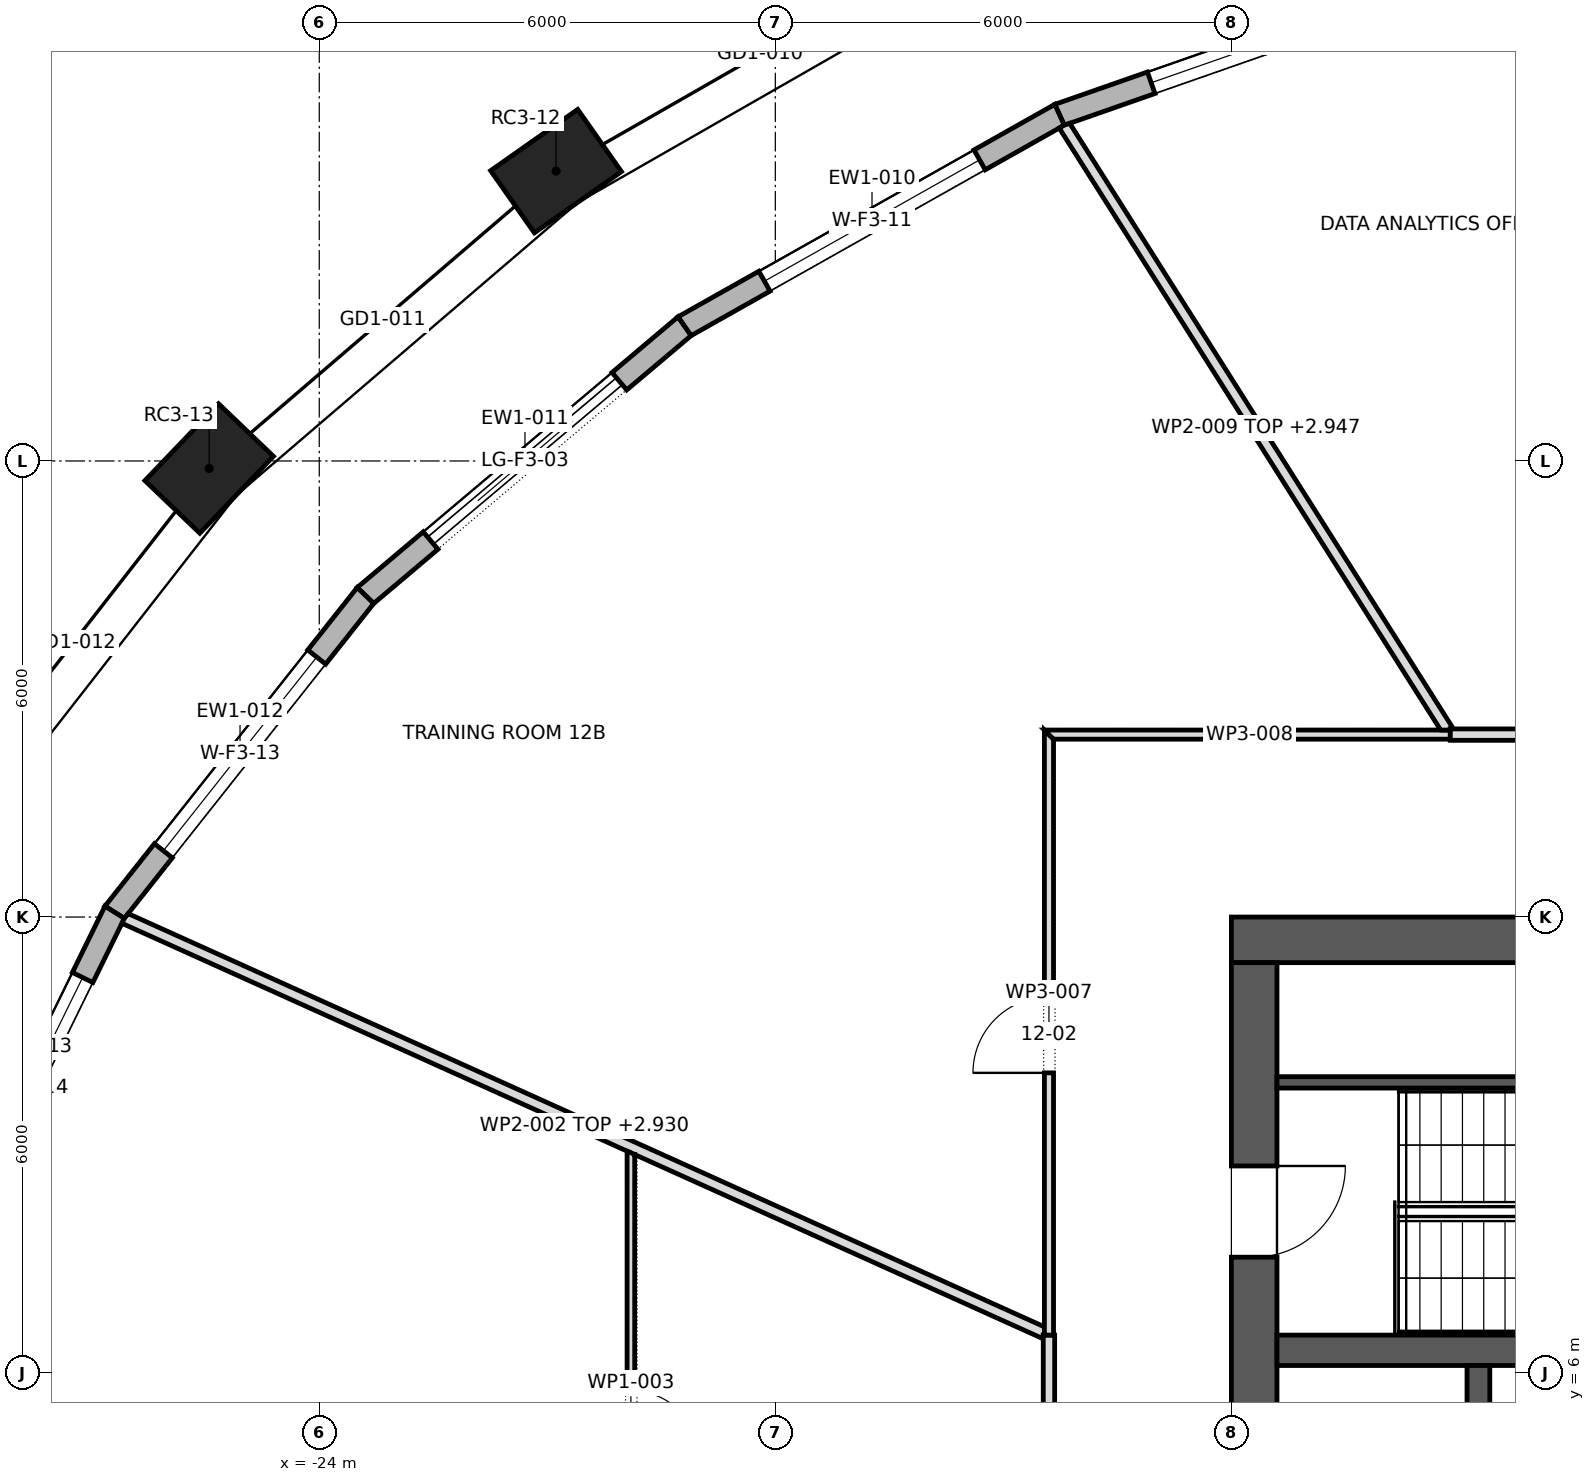
"""IFC4 building model, lengths in metres.
Left out: names, types, materials, properties, quantities, classifications, styles, units other than length and angle.
Written with IfcOpenShell. Run it as: python <this file> out.ifc"""

import sys

from ifc_helpers import new_model, si_unit, direction, frame, frame_2d, origin, origin_2d, place, context, subcontext, project, spatial, polyline, rectangle, outline, extrude, element, fill, save


model = new_model("IFC4")
c1 = context("Model", 3, precision=1e-05, world=origin(), true_north=direction((0.0, 1.0)))
c2 = subcontext(c1, "Body", "Model", "MODEL_VIEW")
j1 = project(units=[si_unit("LENGTHUNIT", "METRE"), si_unit("PLANEANGLEUNIT", "RADIAN")], contexts=[c1])
p1 = place(None, origin())
s1 = spatial("IfcSite", under=j1, at=p1, CompositionType="ELEMENT")
p2 = place(p1, origin())
s2 = spatial("IfcBuilding", under=s1, at=p2, CompositionType="ELEMENT")
p3 = place(p2, frame((0.0, 0.0, 178.9)))
s3 = spatial("IfcBuildingStorey", under=s2, at=p3, CompositionType="ELEMENT", Elevation=178.9)
for number, where, z_axis, x_axis in (
    (1, (-20.885, 21.813, 0.0), (0.0, 0.0, 1.0), (-0.818, -0.575, 0.0)),
    (2, (-25.448, 17.901, 0.0), (0.0, 0.0, 1.0), (-0.692, -0.722, 0.0)),
):
    element("IfcColumn", number, at=place(p3, frame(where, z_axis=z_axis, x_axis=x_axis)), inside=s3, PredefinedType="COLUMN", context=c2, shape_type="SweptSolid", body=[
        extrude(rectangle(XDim=1.4, YDim=1.0, at=origin_2d()), origin(), (0.0, 0.0, 1.0), 4.0),
    ])
p4 = place(p3, frame((-12.0, 11.7, 0.0), z_axis=(0.0, 0.0, 1.0), x_axis=(1.0, 0.0, 0.0)))
e3 = element("IfcWall", 3, at=p4, inside=s3, PredefinedType="SHEAR", context=c2, shape_type="SweptSolid", body=[
    extrude(rectangle(XDim=24.0, YDim=0.6, at=frame_2d((12.0, 0.0))), origin(), (0.0, 0.0, 1.0), 4.0),
])
p5 = place(p4, frame((9.225, 0.0, 0.0)))
e4 = element("IfcOpeningElement", 4, at=p5, cuts=e3, PredefinedType="OPENING", context=c2, shape_type="SweptSolid", body=[
    extrude(rectangle(XDim=0.9, YDim=2.1, at=frame_2d((0.45, 1.05))), frame((0.0, 0.312, 0.0), z_axis=(0.0, -1.0, 0.0), x_axis=(1.0, 0.0, 0.0)), (0.0, 0.0, 1.0), 0.624),
])
p6 = place(p4, frame((10.925, 0.0, 0.0)))
e5 = element("IfcOpeningElement", 5, at=p6, cuts=e3, PredefinedType="OPENING", context=c2, shape_type="SweptSolid", body=[
    extrude(rectangle(XDim=0.8, YDim=2.1, at=frame_2d((0.4, 1.05))), frame((0.0, 0.312, 0.0), z_axis=(0.0, -1.0, 0.0), x_axis=(1.0, 0.0, 0.0)), (0.0, 0.0, 1.0), 0.624),
])
p7 = place(p4, frame((4.2, 0.0, 0.0)))
e6 = element("IfcOpeningElement", 6, at=p7, cuts=e3, PredefinedType="OPENING", context=c2, shape_type="SweptSolid", body=[
    extrude(rectangle(XDim=0.8, YDim=2.1, at=frame_2d((0.4, 1.05))), frame((0.0, 0.312, 0.0), z_axis=(0.0, -1.0, 0.0), x_axis=(1.0, 0.0, 0.0)), (0.0, 0.0, 1.0), 0.624),
])
p8 = place(p4, frame((13.8, 0.0, 0.0)))
e7 = element("IfcOpeningElement", 7, at=p8, cuts=e3, PredefinedType="OPENING", context=c2, shape_type="SweptSolid", body=[
    extrude(rectangle(XDim=0.8, YDim=2.1, at=frame_2d((0.4, 1.05))), frame((0.0, 0.312, 0.0), z_axis=(0.0, -1.0, 0.0), x_axis=(1.0, 0.0, 0.0)), (0.0, 0.0, 1.0), 0.624),
])
p9 = place(p4, frame((16.6, 0.0, 0.0)))
e8 = element("IfcOpeningElement", 8, at=p9, cuts=e3, PredefinedType="OPENING", context=c2, shape_type="SweptSolid", body=[
    extrude(rectangle(XDim=0.8, YDim=2.1, at=frame_2d((0.4, 1.05))), frame((0.0, 0.312, 0.0), z_axis=(0.0, -1.0, 0.0), x_axis=(1.0, 0.0, 0.0)), (0.0, 0.0, 1.0), 0.624),
])
p10 = place(p3, frame((-11.7, -11.4, 0.0), z_axis=(0.0, 0.0, 1.0), x_axis=(0.0, 1.0, 0.0)))
e9 = element("IfcWall", 9, at=p10, inside=s3, PredefinedType="SHEAR", context=c2, shape_type="SweptSolid", body=[
    extrude(rectangle(XDim=22.8, YDim=0.6, at=frame_2d((11.4, 0.0))), origin(), (0.0, 0.0, 1.0), 4.0),
])
p11 = place(p10, frame((10.2, 0.0, 0.0)))
e10 = element("IfcOpeningElement", 10, at=p11, cuts=e9, PredefinedType="OPENING", context=c2, shape_type="SweptSolid", body=[
    extrude(rectangle(XDim=2.4, YDim=2.1, at=frame_2d((1.2, 1.05))), frame((0.0, 0.312, 0.0), z_axis=(0.0, -1.0, 0.0), x_axis=(1.0, 0.0, 0.0)), (0.0, 0.0, 1.0), 0.624),
])
p12 = place(p10, frame((18.925, 0.0, 0.0)))
e11 = element("IfcOpeningElement", 11, at=p12, cuts=e9, PredefinedType="OPENING", context=c2, shape_type="SweptSolid", body=[
    extrude(rectangle(XDim=1.2, YDim=2.1, at=frame_2d((0.6, 1.05))), frame((0.0, 0.312, 0.0), z_axis=(0.0, -1.0, 0.0), x_axis=(1.0, 0.0, 0.0)), (0.0, 0.0, 1.0), 0.624),
])
p13 = place(p10, frame((2.675, 0.0, 0.0)))
e12 = element("IfcOpeningElement", 12, at=p13, cuts=e9, PredefinedType="OPENING", context=c2, shape_type="SweptSolid", body=[
    extrude(rectangle(XDim=1.2, YDim=2.1, at=frame_2d((0.6, 1.05))), frame((0.0, 0.312, 0.0), z_axis=(0.0, -1.0, 0.0), x_axis=(1.0, 0.0, 0.0)), (0.0, 0.0, 1.0), 0.624),
])
p14 = place(p3, frame((-11.4, 6.3, 0.0), z_axis=(0.0, 0.0, 1.0), x_axis=(1.0, 0.0, 0.0)))
e13 = element("IfcWall", 13, at=p14, inside=s3, PredefinedType="SHEAR", context=c2, shape_type="SweptSolid", body=[
    extrude(rectangle(XDim=22.8, YDim=0.4, at=frame_2d((11.4, 0.0))), origin(), (0.0, 0.0, 1.0), 4.0),
])
p15 = place(p14, frame((20.85, 0.0, 0.0)))
e14 = element("IfcOpeningElement", 14, at=p15, cuts=e13, PredefinedType="OPENING", context=c2, shape_type="SweptSolid", body=[
    extrude(rectangle(XDim=1.1, YDim=2.1, at=frame_2d((0.55, 1.05))), frame((0.0, 0.212, 0.0), z_axis=(0.0, -1.0, 0.0), x_axis=(1.0, 0.0, 0.0)), (0.0, 0.0, 1.0), 0.424),
])
p16 = place(p3, frame((-8.75, 3.2, 0.0), z_axis=(0.0, 0.0, 1.0), x_axis=(0.0, 1.0, 0.0)))
e15 = element("IfcWall", 15, at=p16, inside=s3, PredefinedType="SHEAR", context=c2, shape_type="SweptSolid", body=[
    extrude(rectangle(XDim=2.9, YDim=0.3, at=frame_2d((1.45, 0.0))), origin(), (0.0, 0.0, 1.0), 4.0),
])
p17 = place(p3, frame((-8.781, 24.469, 0.0), z_axis=(0.0, 0.0, 1.0), x_axis=(-0.943990724372, -0.329971987144, 0.0)))
e16 = element("IfcWall", 16, at=p17, inside=s3, PredefinedType="STANDARD", context=c2, shape_type="SweptSolid", body=[
    extrude(outline(polyline([(-0.013, -0.15), (5.819, -0.15), (5.792, 0.15), (0.013, 0.15), (-0.013, -0.15)])), origin(), (0.0, 0.0, 1.0), 3.7),
])
p18 = place(p17, frame((1.278, 0.0, 0.6)))
e17 = element("IfcOpeningElement", 17, at=p18, cuts=e16, PredefinedType="OPENING", context=c2, shape_type="SweptSolid", body=[
    extrude(rectangle(XDim=3.25, YDim=2.65, at=frame_2d((1.625, 1.325))), frame((0.0, 0.162, 0.0), z_axis=(0.0, -1.0, 0.0), x_axis=(1.0, 0.0, 0.0)), (0.0, 0.0, 1.0), 0.324),
])
p19 = place(p3, frame((-14.261, 22.554, 0.0), z_axis=(0.0, 0.0, 1.0), x_axis=(-0.871077775545, -0.491145099691, 0.0)))
e18 = element("IfcWall", 18, at=p19, inside=s3, PredefinedType="STANDARD", context=c2, shape_type="SweptSolid", body=[
    extrude(outline(polyline([(-0.013, -0.15), (5.678, -0.15), (5.65, 0.15), (0.013, 0.15), (-0.013, -0.15)])), origin(), (0.0, 0.0, 1.0), 3.7),
])
p20 = place(p19, frame((1.207, 0.0, 0.6)))
e19 = element("IfcOpeningElement", 19, at=p20, cuts=e18, PredefinedType="OPENING", context=c2, shape_type="SweptSolid", body=[
    extrude(rectangle(XDim=3.25, YDim=2.65, at=frame_2d((1.625, 1.325))), frame((0.0, 0.162, 0.0), z_axis=(0.0, -1.0, 0.0), x_axis=(1.0, 0.0, 0.0)), (0.0, 0.0, 1.0), 0.324),
])
p21 = place(p3, frame((-19.195, 19.772, 0.0), z_axis=(0.0, 0.0, 1.0), x_axis=(-0.764238764041, -0.64493341636, 0.0)))
e20 = element("IfcWall", 20, at=p21, inside=s3, PredefinedType="STANDARD", context=c2, shape_type="SweptSolid", body=[
    extrude(outline(polyline([(-0.014, -0.15), (5.508, -0.15), (5.477, 0.15), (0.014, 0.15), (-0.014, -0.15)])), origin(), (0.0, 0.0, 1.0), 3.7),
])
p22 = place(p21, frame((1.121, 0.0, 0.0)))
e21 = element("IfcOpeningElement", 21, at=p22, cuts=e20, PredefinedType="OPENING", context=c2, shape_type="SweptSolid", body=[
    extrude(rectangle(XDim=3.25, YDim=3.25, at=frame_2d((1.625, 1.625))), frame((0.0, 0.162, 0.0), z_axis=(0.0, -1.0, 0.0), x_axis=(1.0, 0.0, 0.0)), (0.0, 0.0, 1.0), 0.324),
])
p23 = place(p3, frame((-23.392, 16.23, 0.0), z_axis=(0.0, 0.0, 1.0), x_axis=(-0.620766467446, -0.78399553117, 0.0)))
e22 = element("IfcWall", 22, at=p23, inside=s3, PredefinedType="STANDARD", context=c2, shape_type="SweptSolid", body=[
    extrude(outline(polyline([(-0.015, -0.15), (5.332, -0.15), (5.3, 0.15), (0.015, 0.15), (-0.015, -0.15)])), origin(), (0.0, 0.0, 1.0), 3.7),
])
p24 = place(p23, frame((1.033, 0.0, 0.6)))
e23 = element("IfcOpeningElement", 23, at=p24, cuts=e22, PredefinedType="OPENING", context=c2, shape_type="SweptSolid", body=[
    extrude(rectangle(XDim=3.25, YDim=2.65, at=frame_2d((1.625, 1.325))), frame((0.0, 0.162, 0.0), z_axis=(0.0, -1.0, 0.0), x_axis=(1.0, 0.0, 0.0)), (0.0, 0.0, 1.0), 0.324),
])
p25 = place(p3, frame((-26.692, 12.062, 0.0), z_axis=(0.0, 0.0, 1.0), x_axis=(-0.440673883676, -0.897667270343, 0.0)))
e24 = element("IfcWall", 24, at=p25, inside=s3, PredefinedType="STANDARD", context=c2, shape_type="SweptSolid", body=[
    extrude(outline(polyline([(-0.016, -0.15), (5.178, -0.15), (5.144, 0.15), (0.016, 0.15), (-0.016, -0.15)])), origin(), (0.0, 0.0, 1.0), 3.7),
])
p26 = place(p25, frame((0.956, 0.0, 0.6)))
e25 = element("IfcOpeningElement", 25, at=p26, cuts=e24, PredefinedType="OPENING", context=c2, shape_type="SweptSolid", body=[
    extrude(rectangle(XDim=3.25, YDim=2.65, at=frame_2d((1.625, 1.325))), frame((0.0, 0.162, 0.0), z_axis=(0.0, -1.0, 0.0), x_axis=(1.0, 0.0, 0.0)), (0.0, 0.0, 1.0), 0.324),
])
p27 = place(p3, frame((-11.4, 9.825, 0.0), z_axis=(0.0, 0.0, 1.0), x_axis=(1.0, 0.0, 0.0)))
e26 = element("IfcWall", 26, at=p27, inside=s3, PredefinedType="SHEAR", context=c2, shape_type="SweptSolid", body=[
    extrude(rectangle(XDim=8.0, YDim=0.15, at=frame_2d((4.0, 0.0))), origin(), (0.0, 0.0, 1.0), 3.7),
])
p28 = place(p3, frame((-26.565, 11.986, 0.0), z_axis=(0.0, 0.0, 1.0), x_axis=(0.911575557789, -0.411132584991, 0.0)))
e27 = element("IfcWall", 27, at=p28, inside=s3, PredefinedType="PARTITIONING", context=c2, shape_type="SweptSolid", body=[
    extrude(outline(polyline([(0.0, -0.075), (1.849, -0.075), (3.698, -0.075), (5.546, -0.075), (7.395, -0.075), (7.399, -0.073), (7.4, -0.075), (9.365, -0.075), (11.331, -0.075), (13.296, -0.075), (13.296, -0.075), (13.276, -0.031), (13.29, -0.024), (13.245, 0.075), (11.356, 0.075), (9.467, 0.075), (7.578, 0.075), (5.689, 0.075), (3.8, 0.075), (1.911, 0.075), (0.022, 0.075), (0.002, -0.003), (0.0, -0.07), (0.0, -0.075)])), origin(), (0.0, 0.0, 1.0), 2.93),
])
p29 = place(p3, frame((-19.9, 1.729, 0.0), z_axis=(0.0, 0.0, 1.0), x_axis=(0.0, 1.0, 0.0)))
e28 = element("IfcWall", 28, at=p29, inside=s3, PredefinedType="PARTITIONING", context=c2, shape_type="SweptSolid", body=[
    extrude(outline(polyline([(0.0, -0.05), (1.787, -0.05), (3.573, -0.05), (5.36, -0.05), (7.146, -0.05), (7.191, 0.049), (7.191, 0.05), (5.396, 0.05), (3.6, 0.05), (1.804, 0.05), (0.008, 0.05), (0.0, -0.048), (0.0, -0.05)])), origin(), (0.0, 0.0, 1.0), 3.7),
])
p30 = place(p29, frame((3.142, 0.0, 0.0)))
e29 = element("IfcOpeningElement", 29, at=p30, cuts=e28, PredefinedType="OPENING", context=c2, shape_type="SweptSolid", body=[
    extrude(rectangle(XDim=0.9, YDim=2.1, at=frame_2d((0.45, 1.05))), frame((0.0, 0.062, 0.0), z_axis=(0.0, -1.0, 0.0), x_axis=(1.0, 0.0, 0.0)), (0.0, 0.0, 1.0), 0.124),
])
p31 = place(p3, frame((-14.4, 1.118, 0.0), z_axis=(0.0, 0.0, 1.0), x_axis=(0.0, 1.0, 0.0)))
e30 = element("IfcWall", 30, at=p31, inside=s3, PredefinedType="PARTITIONING", context=c2, shape_type="SweptSolid", body=[
    extrude(outline(polyline([(5.382, 0.075), (3.642, 0.075), (1.903, 0.075), (0.163, 0.075), (0.0, -0.075), (1.794, -0.075), (3.588, -0.075), (5.382, -0.075), (5.382, 0.075)])), origin(), (0.0, 0.0, 1.0), 3.7),
])
p32 = place(p3, frame((-14.4, 6.5, 0.0), z_axis=(0.0, 0.0, 1.0), x_axis=(0.0, 1.0, 0.0)))
e31 = element("IfcWall", 31, at=p32, inside=s3, PredefinedType="PARTITIONING", context=c2, shape_type="SweptSolid", body=[
    extrude(outline(polyline([(0.0, -0.06), (1.96, -0.06), (3.92, -0.06), (5.88, -0.06), (7.84, -0.06), (7.96, 0.06), (5.97, 0.06), (3.98, 0.06), (1.99, 0.06), (0.0, 0.06), (0.0, -0.06)])), origin(), (0.0, 0.0, 1.0), 3.7),
])
p33 = place(p32, frame((3.45, 0.0, 0.0)))
e32 = element("IfcOpeningElement", 32, at=p33, cuts=e31, PredefinedType="OPENING", context=c2, shape_type="SweptSolid", body=[
    extrude(rectangle(XDim=1.0, YDim=2.1, at=frame_2d((0.5, 1.05))), frame((0.0, 0.072, 0.0), z_axis=(0.0, -1.0, 0.0), x_axis=(1.0, 0.0, 0.0)), (0.0, 0.0, 1.0), 0.144),
])
p34 = place(p3, frame((-14.46, 14.4, 0.0), z_axis=(0.0, 0.0, 1.0), x_axis=(1.0, 0.0, 0.0)))
e33 = element("IfcWall", 33, at=p34, inside=s3, PredefinedType="PARTITIONING", context=c2, shape_type="SweptSolid", body=[
    extrude(outline(polyline([(5.34, 0.06), (3.56, 0.06), (1.78, 0.06), (0.0, 0.06), (0.12, -0.06), (1.86, -0.06), (3.6, -0.06), (5.34, -0.06), (5.34, 0.06)])), origin(), (0.0, 0.0, 1.0), 3.7),
])
p35 = place(p3, frame((-9.142, 14.435, 0.0), z_axis=(0.0, 0.0, 1.0), x_axis=(-0.535245013247, 0.844696854377, 0.0)))
e34 = element("IfcWall", 34, at=p35, inside=s3, PredefinedType="PARTITIONING", context=c2, shape_type="SweptSolid", body=[
    extrude(outline(polyline([(0.0, -0.075), (1.886, -0.075), (3.773, -0.075), (5.659, -0.075), (7.545, -0.075), (9.432, -0.075), (9.449, -0.001), (9.452, 0.069), (9.452, 0.075), (7.577, 0.075), (5.702, 0.075), (3.827, 0.075), (1.952, 0.075), (0.077, 0.075), (0.009, -0.032), (0.022, -0.04), (0.0, -0.075), (0.0, -0.075)])), origin(), (0.0, 0.0, 1.0), 2.947),
])
p36 = place(p3, frame((-9.12, 14.4, 0.0), z_axis=(0.0, 0.0, 1.0), x_axis=(1.0, 0.0, 0.0)))
e35 = element("IfcWall", 35, at=p36, inside=s3, PredefinedType="PARTITIONING", context=c2, shape_type="SweptSolid", body=[
    extrude(outline(polyline([(7.524, -0.075), (7.524, -0.075), (7.356, 0.075), (5.517, 0.075), (3.678, 0.075), (1.839, 0.075), (0.0, 0.075), (0.0, -0.075), (1.881, -0.075), (3.762, -0.075), (5.643, -0.075), (7.524, -0.075)])), origin(), (0.0, 0.0, 1.0), 3.7),
])
p37 = place(p18, origin())
e36 = element("IfcWindow", 36, at=p37, inside=s3, PartitioningType="TRIPLE_PANEL_VERTICAL", PredefinedType="WINDOW", context=c2, shape_type="SweptSolid", body=[
    extrude(rectangle(XDim=3.25, YDim=2.65, at=frame_2d((1.625, 1.325))), frame((0.0, 0.03, 0.0), z_axis=(0.0, -1.0, 0.0), x_axis=(1.0, 0.0, 0.0)), (0.0, 0.0, 1.0), 0.06),
])
fill(e17, e36)
p38 = place(p20, origin())
e37 = element("IfcWindow", 37, at=p38, inside=s3, PartitioningType="TRIPLE_PANEL_VERTICAL", PredefinedType="WINDOW", context=c2, shape_type="SweptSolid", body=[
    extrude(rectangle(XDim=3.25, YDim=2.65, at=frame_2d((1.625, 1.325))), frame((0.0, 0.03, 0.0), z_axis=(0.0, -1.0, 0.0), x_axis=(1.0, 0.0, 0.0)), (0.0, 0.0, 1.0), 0.06),
])
fill(e19, e37)
p39 = place(p22, origin())
e38 = element("IfcDoor", 38, at=p39, inside=s3, OperationType="DOUBLE_DOOR_SLIDING", PredefinedType="DOOR", context=c2, shape_type="SweptSolid", body=[
    extrude(rectangle(XDim=3.25, YDim=3.25, at=frame_2d((1.625, 1.625))), frame((0.0, 0.025, 0.0), z_axis=(0.0, -1.0, 0.0), x_axis=(1.0, 0.0, 0.0)), (0.0, 0.0, 1.0), 0.05),
])
fill(e21, e38)
p40 = place(p24, origin())
e39 = element("IfcWindow", 39, at=p40, inside=s3, PartitioningType="TRIPLE_PANEL_VERTICAL", PredefinedType="WINDOW", context=c2, shape_type="SweptSolid", body=[
    extrude(rectangle(XDim=3.25, YDim=2.65, at=frame_2d((1.625, 1.325))), frame((0.0, 0.03, 0.0), z_axis=(0.0, -1.0, 0.0), x_axis=(1.0, 0.0, 0.0)), (0.0, 0.0, 1.0), 0.06),
])
fill(e23, e39)
p41 = place(p26, origin())
e40 = element("IfcWindow", 40, at=p41, inside=s3, PartitioningType="TRIPLE_PANEL_VERTICAL", PredefinedType="WINDOW", context=c2, shape_type="SweptSolid", body=[
    extrude(rectangle(XDim=3.25, YDim=2.65, at=frame_2d((1.625, 1.325))), frame((0.0, 0.03, 0.0), z_axis=(0.0, -1.0, 0.0), x_axis=(1.0, 0.0, 0.0)), (0.0, 0.0, 1.0), 0.06),
])
fill(e25, e40)
p42 = place(p12, frame((1.2, 0.0, 0.0), z_axis=(0.0, 0.0, 1.0), x_axis=(-1.0, 0.0, 0.0)))
e41 = element("IfcDoor", 41, at=p42, inside=s3, OperationType="SINGLE_SWING_RIGHT", PredefinedType="DOOR", context=c2, shape_type="SweptSolid", body=[
    extrude(rectangle(XDim=1.2, YDim=2.1, at=frame_2d((0.6, 1.05))), frame((0.0, 0.025, 0.0), z_axis=(0.0, -1.0, 0.0), x_axis=(1.0, 0.0, 0.0)), (0.0, 0.0, 1.0), 0.05),
])
fill(e11, e41)
p43 = place(p33, origin())
e42 = element("IfcDoor", 42, at=p43, inside=s3, OperationType="SINGLE_SWING_RIGHT", PredefinedType="DOOR", context=c2, shape_type="SweptSolid", body=[
    extrude(rectangle(XDim=1.0, YDim=2.1, at=frame_2d((0.5, 1.05))), frame((0.0, 0.025, 0.0), z_axis=(0.0, -1.0, 0.0), x_axis=(1.0, 0.0, 0.0)), (0.0, 0.0, 1.0), 0.05),
])
fill(e32, e42)
p44 = place(p30, frame((0.9, 0.0, 0.0), z_axis=(0.0, 0.0, 1.0), x_axis=(-1.0, 0.0, 0.0)))
e43 = element("IfcDoor", 43, at=p44, inside=s3, OperationType="SINGLE_SWING_LEFT", PredefinedType="DOOR", context=c2, shape_type="SweptSolid", body=[
    extrude(rectangle(XDim=0.9, YDim=2.1, at=frame_2d((0.45, 1.05))), frame((0.0, 0.025, 0.0), z_axis=(0.0, -1.0, 0.0), x_axis=(1.0, 0.0, 0.0)), (0.0, 0.0, 1.0), 0.05),
])
fill(e29, e43)
save(model, sys.argv[1])
